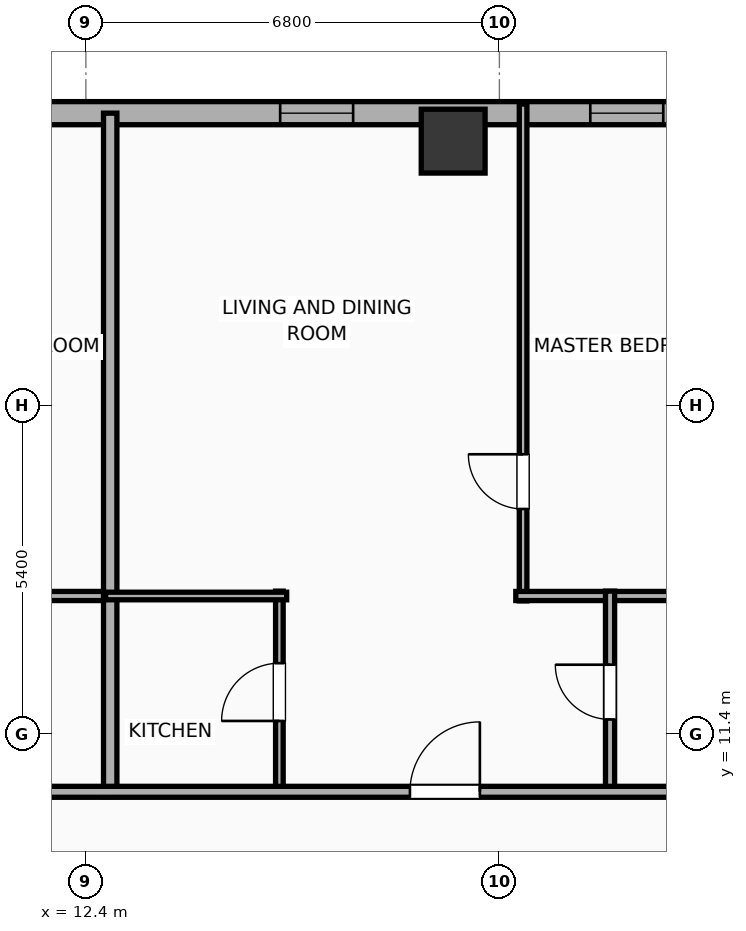
"""IFC4 building model, lengths in metres.
Left out: names, types, materials, properties, quantities, classifications, styles, units other than length and angle.
Written with IfcOpenShell. Run it as: python <this file> out.ifc"""

import sys

from ifc_helpers import new_model, si_unit, direction, frame, frame_2d, origin, origin_2d, place, context, subcontext, project, spatial, rectangle, hollow_rectangle, extrude, element, fill, save


model = new_model("IFC4")
c1 = context("Model", 3, precision=1e-05, world=origin(), true_north=direction((0.0, 1.0)))
c2 = subcontext(c1, "Body", "Model", "MODEL_VIEW")
j1 = project(units=[si_unit("LENGTHUNIT", "METRE"), si_unit("PLANEANGLEUNIT", "RADIAN")], contexts=[c1])
p1 = place(None, origin())
s1 = spatial("IfcSite", under=j1, at=p1, CompositionType="ELEMENT")
p2 = place(p1, origin())
s2 = spatial("IfcBuilding", under=s1, at=p2, CompositionType="ELEMENT")
p3 = place(p2, frame((0.0, 0.0, 93.6)))
s3 = spatial("IfcBuildingStorey", under=s2, at=p3, CompositionType="ELEMENT", Elevation=93.6)
p4 = place(p3, frame((18.44, 21.15, 0.0), z_axis=(0.0, 0.0, 1.0), x_axis=(1.0, 0.0, 0.0)))
e1 = element("IfcColumn", 1, at=p4, inside=s3, PredefinedType="COLUMN", context=c2, shape_type="SweptSolid", body=[
    extrude(hollow_rectangle(XDim=1.05, YDim=1.05, WallThickness=0.036, at=origin_2d()), origin(), (0.0, 0.0, 1.0), 3.9),
])
p5 = place(p3, frame((-25.381, 21.61, 0.0), z_axis=(0.0, 0.0, 1.0), x_axis=(1.0, 0.0, 0.0)))
e2 = element("IfcWall", 2, at=p5, inside=s3, PredefinedType="ELEMENTEDWALL", context=c2, shape_type="SweptSolid", body=[
    extrude(rectangle(XDim=54.763, YDim=0.38, at=frame_2d((27.381, 0.0))), origin(), (0.0, 0.0, 1.0), 3.65),
])
p6 = place(p5, frame((4.795, 0.0, 0.75)))
e3 = element("IfcOpeningElement", 3, at=p6, cuts=e2, PredefinedType="OPENING", context=c2, shape_type="SweptSolid", body=[
    extrude(rectangle(XDim=2.4, YDim=2.1, at=frame_2d((1.2, 1.05))), frame((0.0, 0.2, 0.0), z_axis=(0.0, -1.0, 0.0), x_axis=(1.0, 0.0, 0.0)), (0.0, 0.0, 1.0), 0.4),
])
p7 = place(p5, frame((2.377, 0.0, 0.75)))
e4 = element("IfcOpeningElement", 4, at=p7, cuts=e2, PredefinedType="OPENING", context=c2, shape_type="SweptSolid", body=[
    extrude(rectangle(XDim=1.2, YDim=2.05, at=frame_2d((0.6, 1.025))), frame((0.0, 0.2, 0.0), z_axis=(0.0, -1.0, 0.0), x_axis=(1.0, 0.0, 0.0)), (0.0, 0.0, 1.0), 0.4),
])
p8 = place(p5, frame((11.707, 0.0, 0.75)))
e5 = element("IfcOpeningElement", 5, at=p8, cuts=e2, PredefinedType="OPENING", context=c2, shape_type="SweptSolid", body=[
    extrude(rectangle(XDim=1.2, YDim=2.05, at=frame_2d((0.6, 1.025))), frame((0.0, 0.2, 0.0), z_axis=(0.0, -1.0, 0.0), x_axis=(1.0, 0.0, 0.0)), (0.0, 0.0, 1.0), 0.4),
])
p9 = place(p5, frame((8.312, 0.0, 0.75)))
e6 = element("IfcOpeningElement", 6, at=p9, cuts=e2, PredefinedType="OPENING", context=c2, shape_type="SweptSolid", body=[
    extrude(rectangle(XDim=1.2, YDim=2.05, at=frame_2d((0.6, 1.025))), frame((0.0, 0.2, 0.0), z_axis=(0.0, -1.0, 0.0), x_axis=(1.0, 0.0, 0.0)), (0.0, 0.0, 1.0), 0.4),
])
p10 = place(p5, frame((15.476, 0.0, 0.75)))
e7 = element("IfcOpeningElement", 7, at=p10, cuts=e2, PredefinedType="OPENING", context=c2, shape_type="SweptSolid", body=[
    extrude(rectangle(XDim=1.2, YDim=2.05, at=frame_2d((0.6, 1.025))), frame((0.0, 0.2, 0.0), z_axis=(0.0, -1.0, 0.0), x_axis=(1.0, 0.0, 0.0)), (0.0, 0.0, 1.0), 0.4),
])
p11 = place(p5, frame((22.628, 0.0, 0.75)))
e8 = element("IfcOpeningElement", 8, at=p11, cuts=e2, PredefinedType="OPENING", context=c2, shape_type="SweptSolid", body=[
    extrude(rectangle(XDim=1.2, YDim=2.05, at=frame_2d((0.6, 1.025))), frame((0.0, 0.2, 0.0), z_axis=(0.0, -1.0, 0.0), x_axis=(1.0, 0.0, 0.0)), (0.0, 0.0, 1.0), 0.4),
])
p12 = place(p5, frame((18.633, 0.0, 0.75)))
e9 = element("IfcOpeningElement", 9, at=p12, cuts=e2, PredefinedType="OPENING", context=c2, shape_type="SweptSolid", body=[
    extrude(rectangle(XDim=1.2, YDim=2.05, at=frame_2d((0.6, 1.025))), frame((0.0, 0.2, 0.0), z_axis=(0.0, -1.0, 0.0), x_axis=(1.0, 0.0, 0.0)), (0.0, 0.0, 1.0), 0.4),
])
p13 = place(p5, frame((25.676, 0.0, 0.75)))
e10 = element("IfcOpeningElement", 10, at=p13, cuts=e2, PredefinedType="OPENING", context=c2, shape_type="SweptSolid", body=[
    extrude(rectangle(XDim=1.2, YDim=2.05, at=frame_2d((0.6, 1.025))), frame((0.0, 0.2, 0.0), z_axis=(0.0, -1.0, 0.0), x_axis=(1.0, 0.0, 0.0)), (0.0, 0.0, 1.0), 0.4),
])
p14 = place(p5, frame((30.881, 0.0, 0.75)))
e11 = element("IfcOpeningElement", 11, at=p14, cuts=e2, PredefinedType="OPENING", context=c2, shape_type="SweptSolid", body=[
    extrude(rectangle(XDim=1.2, YDim=2.05, at=frame_2d((0.6, 1.025))), frame((0.0, 0.2, 0.0), z_axis=(0.0, -1.0, 0.0), x_axis=(1.0, 0.0, 0.0)), (0.0, 0.0, 1.0), 0.4),
])
p15 = place(p5, frame((28.686, 0.0, 0.75)))
e12 = element("IfcOpeningElement", 12, at=p15, cuts=e2, PredefinedType="OPENING", context=c2, shape_type="SweptSolid", body=[
    extrude(rectangle(XDim=1.2, YDim=2.05, at=frame_2d((0.6, 1.025))), frame((0.0, 0.2, 0.0), z_axis=(0.0, -1.0, 0.0), x_axis=(1.0, 0.0, 0.0)), (0.0, 0.0, 1.0), 0.4),
])
p16 = place(p5, frame((35.876, 0.0, 0.75)))
e13 = element("IfcOpeningElement", 13, at=p16, cuts=e2, PredefinedType="OPENING", context=c2, shape_type="SweptSolid", body=[
    extrude(rectangle(XDim=1.2, YDim=2.05, at=frame_2d((0.6, 1.025))), frame((0.0, 0.2, 0.0), z_axis=(0.0, -1.0, 0.0), x_axis=(1.0, 0.0, 0.0)), (0.0, 0.0, 1.0), 0.4),
])
p17 = place(p5, frame((40.976, 0.0, 0.75)))
e14 = element("IfcOpeningElement", 14, at=p17, cuts=e2, PredefinedType="OPENING", context=c2, shape_type="SweptSolid", body=[
    extrude(rectangle(XDim=1.2, YDim=2.05, at=frame_2d((0.6, 1.025))), frame((0.0, 0.2, 0.0), z_axis=(0.0, -1.0, 0.0), x_axis=(1.0, 0.0, 0.0)), (0.0, 0.0, 1.0), 0.4),
])
p18 = place(p5, frame((46.076, 0.0, 0.75)))
e15 = element("IfcOpeningElement", 15, at=p18, cuts=e2, PredefinedType="OPENING", context=c2, shape_type="SweptSolid", body=[
    extrude(rectangle(XDim=1.2, YDim=2.05, at=frame_2d((0.6, 1.025))), frame((0.0, 0.2, 0.0), z_axis=(0.0, -1.0, 0.0), x_axis=(1.0, 0.0, 0.0)), (0.0, 0.0, 1.0), 0.4),
])
p19 = place(p5, frame((50.527, 0.0, 0.75)))
e16 = element("IfcOpeningElement", 16, at=p19, cuts=e2, PredefinedType="OPENING", context=c2, shape_type="SweptSolid", body=[
    extrude(rectangle(XDim=1.2, YDim=2.05, at=frame_2d((0.6, 1.025))), frame((0.0, 0.2, 0.0), z_axis=(0.0, -1.0, 0.0), x_axis=(1.0, 0.0, 0.0)), (0.0, 0.0, 1.0), 0.4),
])
p20 = place(p3, frame((9.27, 13.67, 0.0), z_axis=(0.0, 0.0, 1.0), x_axis=(1.0, 0.0, 0.0)))
e17 = element("IfcWall", 17, at=p20, inside=s3, PredefinedType="PLUMBINGWALL", context=c2, shape_type="SweptSolid", body=[
    extrude(rectangle(XDim=3.605, YDim=0.15, at=frame_2d((1.802, 0.0))), origin(), (0.0, 0.0, 1.0), 3.65),
])
p21 = place(p3, frame((12.8, 10.37, 0.0), z_axis=(0.0, 0.0, 1.0), x_axis=(0.0, 1.0, 0.0)))
e18 = element("IfcWall", 18, at=p21, inside=s3, PredefinedType="PARTITIONING", context=c2, shape_type="SweptSolid", body=[
    extrude(rectangle(XDim=11.24, YDim=0.22, at=frame_2d((5.62, 0.0))), origin(), (0.0, 0.0, 1.0), 3.65),
])
p22 = place(p3, frame((19.59, 13.59, 0.0), z_axis=(0.0, 0.0, 1.0), x_axis=(0.0, 1.0, 0.0)))
e19 = element("IfcWall", 19, at=p22, inside=s3, PredefinedType="PARTITIONING", context=c2, shape_type="SweptSolid", body=[
    extrude(rectangle(XDim=8.17, YDim=0.125, at=frame_2d((4.085, 0.0))), origin(), (0.0, 0.0, 1.0), 3.65),
])
p23 = place(p22, frame((1.511, 0.0, 0.0)))
e20 = element("IfcOpeningElement", 20, at=p23, cuts=e19, PredefinedType="OPENING", context=c2, shape_type="SweptSolid", body=[
    extrude(rectangle(XDim=0.9, YDim=2.05, at=frame_2d((0.45, 1.025))), frame((0.0, 0.073, 0.0), z_axis=(0.0, -1.0, 0.0), x_axis=(1.0, 0.0, 0.0)), (0.0, 0.0, 1.0), 0.145),
])
p24 = place(p3, frame((19.47, 13.67, 0.0), z_axis=(0.0, 0.0, 1.0), x_axis=(1.0, 0.0, 0.0)))
e21 = element("IfcWall", 21, at=p24, inside=s3, PredefinedType="PLUMBINGWALL", context=c2, shape_type="SweptSolid", body=[
    extrude(rectangle(XDim=3.605, YDim=0.15, at=frame_2d((1.802, 0.0))), origin(), (0.0, 0.0, 1.0), 3.65),
])
p25 = place(p3, frame((15.582, 10.43, 0.0), z_axis=(0.0, 0.0, 1.0), x_axis=(0.0, 1.0, 0.0)))
e22 = element("IfcWall", 22, at=p25, inside=s3, PredefinedType="PARTITIONING", context=c2, shape_type="SweptSolid", body=[
    extrude(rectangle(XDim=3.32, YDim=0.125, at=frame_2d((1.66, 0.0))), origin(), (0.0, 0.0, 1.0), 3.65),
])
p26 = place(p25, frame((1.185, 0.0, 0.0)))
e23 = element("IfcOpeningElement", 23, at=p26, cuts=e22, PredefinedType="OPENING", context=c2, shape_type="SweptSolid", body=[
    extrude(rectangle(XDim=0.95, YDim=2.05, at=frame_2d((0.475, 1.025))), frame((0.0, 0.073, 0.0), z_axis=(0.0, -1.0, 0.0), x_axis=(1.0, 0.0, 0.0)), (0.0, 0.0, 1.0), 0.145),
])
p27 = place(p3, frame((12.725, 13.67, 0.0), z_axis=(0.0, 0.0, 1.0), x_axis=(1.0, 0.0, 0.0)))
e24 = element("IfcWall", 24, at=p27, inside=s3, PredefinedType="PARTITIONING", context=c2, shape_type="SweptSolid", body=[
    extrude(rectangle(XDim=2.977, YDim=0.125, at=frame_2d((1.488, 0.0))), origin(), (0.0, 0.0, 1.0), 3.65),
])
p28 = place(p3, frame((21.02, 10.43, 0.0), z_axis=(0.0, 0.0, 1.0), x_axis=(0.0, 1.0, 0.0)))
e25 = element("IfcWall", 25, at=p28, inside=s3, PredefinedType="PLUMBINGWALL", context=c2, shape_type="SweptSolid", body=[
    extrude(rectangle(XDim=3.32, YDim=0.15, at=frame_2d((1.66, 0.0))), origin(), (0.0, 0.0, 1.0), 3.65),
])
p29 = place(p28, frame((1.21, 0.0, 0.0)))
e26 = element("IfcOpeningElement", 26, at=p29, cuts=e25, PredefinedType="OPENING", context=c2, shape_type="SweptSolid", body=[
    extrude(rectangle(XDim=0.9, YDim=2.05, at=frame_2d((0.45, 1.025))), frame((0.0, 0.085, 0.0), z_axis=(0.0, -1.0, 0.0), x_axis=(1.0, 0.0, 0.0)), (0.0, 0.0, 1.0), 0.17),
])
p30 = place(p3, frame((-29.21, 10.45, 0.0), z_axis=(0.0, 0.0, 1.0), x_axis=(1.0, 0.0, 0.0)))
e27 = element("IfcWall", 27, at=p30, inside=s3, PredefinedType="PARTITIONING", context=c2, shape_type="SweptSolid", body=[
    extrude(rectangle(XDim=62.42, YDim=0.18, at=frame_2d((31.21, 0.0))), origin(), (0.0, 0.0, 1.0), 3.65),
])
p31 = place(p30, frame((2.534, 0.0, 0.0)))
e28 = element("IfcOpeningElement", 28, at=p31, cuts=e27, PredefinedType="OPENING", context=c2, shape_type="SweptSolid", body=[
    extrude(rectangle(XDim=0.9, YDim=2.05, at=frame_2d((0.45, 1.025))), frame((0.0, 0.1, 0.0), z_axis=(0.0, -1.0, 0.0), x_axis=(1.0, 0.0, 0.0)), (0.0, 0.0, 1.0), 0.2),
])
p32 = place(p30, frame((9.056, 0.0, 0.0)))
e29 = element("IfcOpeningElement", 29, at=p32, cuts=e27, PredefinedType="OPENING", context=c2, shape_type="SweptSolid", body=[
    extrude(rectangle(XDim=1.15, YDim=2.05, at=frame_2d((0.575, 1.025))), frame((0.0, 0.1, 0.0), z_axis=(0.0, -1.0, 0.0), x_axis=(1.0, 0.0, 0.0)), (0.0, 0.0, 1.0), 0.2),
])
p33 = place(p30, frame((16.303, 0.0, 0.0)))
e30 = element("IfcOpeningElement", 30, at=p33, cuts=e27, PredefinedType="OPENING", context=c2, shape_type="SweptSolid", body=[
    extrude(rectangle(XDim=1.15, YDim=2.05, at=frame_2d((0.575, 1.025))), frame((0.0, 0.1, 0.0), z_axis=(0.0, -1.0, 0.0), x_axis=(1.0, 0.0, 0.0)), (0.0, 0.0, 1.0), 0.2),
])
p34 = place(p30, frame((26.565, 0.0, 0.0)))
e31 = element("IfcOpeningElement", 31, at=p34, cuts=e27, PredefinedType="OPENING", context=c2, shape_type="SweptSolid", body=[
    extrude(rectangle(XDim=1.15, YDim=2.05, at=frame_2d((0.575, 1.025))), frame((0.0, 0.1, 0.0), z_axis=(0.0, -1.0, 0.0), x_axis=(1.0, 0.0, 0.0)), (0.0, 0.0, 1.0), 0.2),
])
p35 = place(p30, frame((36.677, 0.0, 0.0)))
e32 = element("IfcOpeningElement", 32, at=p35, cuts=e27, PredefinedType="OPENING", context=c2, shape_type="SweptSolid", body=[
    extrude(rectangle(XDim=1.15, YDim=2.05, at=frame_2d((0.575, 1.025))), frame((0.0, 0.1, 0.0), z_axis=(0.0, -1.0, 0.0), x_axis=(1.0, 0.0, 0.0)), (0.0, 0.0, 1.0), 0.2),
])
p36 = place(p30, frame((46.939, 0.0, 0.0)))
e33 = element("IfcOpeningElement", 33, at=p36, cuts=e27, PredefinedType="OPENING", context=c2, shape_type="SweptSolid", body=[
    extrude(rectangle(XDim=1.15, YDim=2.05, at=frame_2d((0.575, 1.025))), frame((0.0, 0.1, 0.0), z_axis=(0.0, -1.0, 0.0), x_axis=(1.0, 0.0, 0.0)), (0.0, 0.0, 1.0), 0.2),
])
p37 = place(p30, frame((57.245, 0.0, 0.0)))
e34 = element("IfcOpeningElement", 34, at=p37, cuts=e27, PredefinedType="OPENING", context=c2, shape_type="SweptSolid", body=[
    extrude(rectangle(XDim=1.15, YDim=2.05, at=frame_2d((0.575, 1.025))), frame((0.0, 0.1, 0.0), z_axis=(0.0, -1.0, 0.0), x_axis=(1.0, 0.0, 0.0)), (0.0, 0.0, 1.0), 0.2),
])
p38 = place(p17, origin())
e35 = element("IfcWindow", 35, at=p38, inside=s3, PartitioningType="SINGLE_PANEL", PredefinedType="WINDOW", context=c2, shape_type="SweptSolid", body=[
    extrude(rectangle(XDim=1.2, YDim=2.05, at=frame_2d((0.6, 1.025))), frame((0.0, 0.03, 0.0), z_axis=(0.0, -1.0, 0.0), x_axis=(1.0, 0.0, 0.0)), (0.0, 0.0, 1.0), 0.06),
])
fill(e14, e35)
p39 = place(p18, origin())
e36 = element("IfcWindow", 36, at=p39, inside=s3, PartitioningType="SINGLE_PANEL", PredefinedType="WINDOW", context=c2, shape_type="SweptSolid", body=[
    extrude(rectangle(XDim=1.2, YDim=2.05, at=frame_2d((0.6, 1.025))), frame((0.0, 0.03, 0.0), z_axis=(0.0, -1.0, 0.0), x_axis=(1.0, 0.0, 0.0)), (0.0, 0.0, 1.0), 0.06),
])
fill(e15, e36)
p40 = place(p23, origin())
e37 = element("IfcDoor", 37, at=p40, inside=s3, OperationType="SINGLE_SWING_RIGHT", PredefinedType="DOOR", context=c2, shape_type="SweptSolid", body=[
    extrude(rectangle(XDim=0.9, YDim=2.05, at=frame_2d((0.45, 1.025))), frame((0.0, 0.025, 0.0), z_axis=(0.0, -1.0, 0.0), x_axis=(1.0, 0.0, 0.0)), (0.0, 0.0, 1.0), 0.05),
])
fill(e20, e37)
p41 = place(p26, origin())
e38 = element("IfcDoor", 38, at=p41, inside=s3, OperationType="SINGLE_SWING_LEFT", PredefinedType="DOOR", context=c2, shape_type="SweptSolid", body=[
    extrude(rectangle(XDim=0.95, YDim=2.05, at=frame_2d((0.475, 1.025))), frame((0.0, 0.025, 0.0), z_axis=(0.0, -1.0, 0.0), x_axis=(1.0, 0.0, 0.0)), (0.0, 0.0, 1.0), 0.05),
])
fill(e23, e38)
p42 = place(p29, origin())
e39 = element("IfcDoor", 39, at=p42, inside=s3, OperationType="SINGLE_SWING_RIGHT", PredefinedType="DOOR", context=c2, shape_type="SweptSolid", body=[
    extrude(rectangle(XDim=0.9, YDim=2.05, at=frame_2d((0.45, 1.025))), frame((0.0, 0.025, 0.0), z_axis=(0.0, -1.0, 0.0), x_axis=(1.0, 0.0, 0.0)), (0.0, 0.0, 1.0), 0.05),
])
fill(e26, e39)
p43 = place(p36, origin())
e40 = element("IfcDoor", 40, at=p43, inside=s3, OperationType="SINGLE_SWING_RIGHT", PredefinedType="DOOR", context=c2, shape_type="SweptSolid", body=[
    extrude(rectangle(XDim=1.15, YDim=2.05, at=frame_2d((0.575, 1.025))), frame((0.0, 0.025, 0.0), z_axis=(0.0, -1.0, 0.0), x_axis=(1.0, 0.0, 0.0)), (0.0, 0.0, 1.0), 0.05),
])
fill(e33, e40)
save(model, sys.argv[1])
